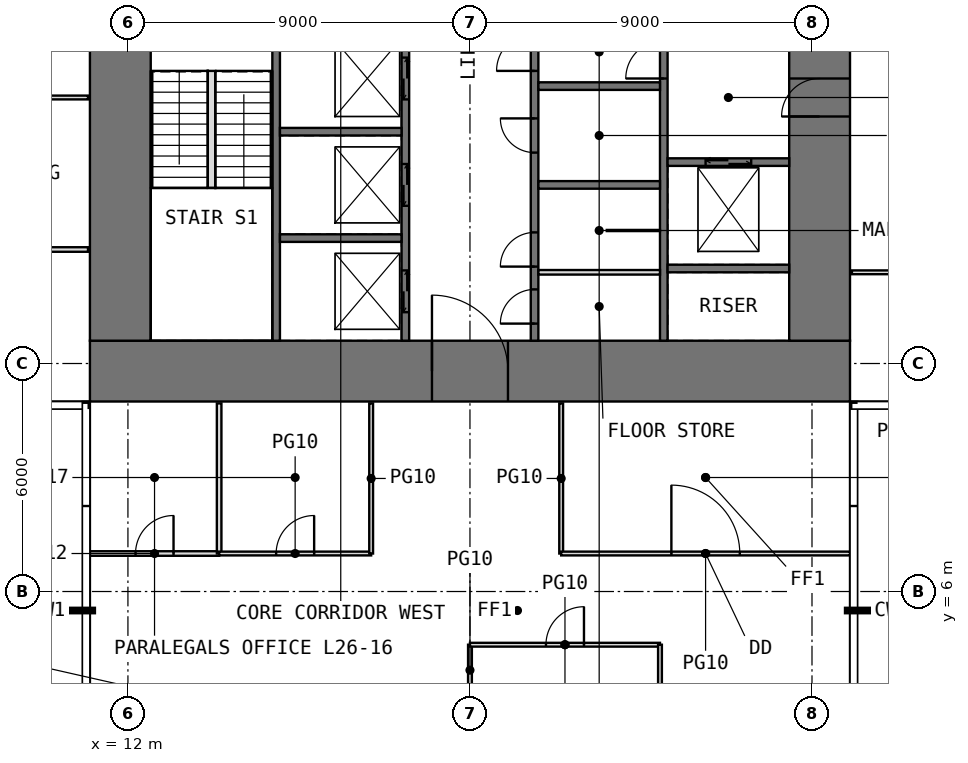
"""IFC4 building model, lengths in metres.
Left out: names, types, materials, properties, quantities, classifications, styles, units other than length and angle.
Written with IfcOpenShell. Run it as: python <this file> out.ifc"""

import sys

from ifc_helpers import new_model, si_unit, direction, frame, frame_2d, origin, place, context, subcontext, project, spatial, rectangle, extrude, element, fill, save


model = new_model("IFC4")
c1 = context("Model", 3, precision=1e-05, world=origin(), true_north=direction((0.0, 1.0)))
c2 = subcontext(c1, "Body", "Model", "MODEL_VIEW")
j1 = project(units=[si_unit("LENGTHUNIT", "METRE"), si_unit("PLANEANGLEUNIT", "RADIAN")], contexts=[c1])
p1 = place(None, origin())
s1 = spatial("IfcSite", under=j1, at=p1, CompositionType="ELEMENT")
p2 = place(p1, origin())
s2 = spatial("IfcBuilding", under=s1, at=p2, CompositionType="ELEMENT")
p3 = place(p2, frame((0.0, 0.0, 112.5)))
s3 = spatial("IfcBuildingStorey", under=s2, at=p3, CompositionType="ELEMENT", Elevation=112.5)
p4 = place(p3, frame((11.0, 11.8, -0.05), z_axis=(0.0, 0.0, 1.0), x_axis=(1.0, 0.0, 0.0)))
e1 = element("IfcWall", 1, at=p4, inside=s3, PredefinedType="SHEAR", context=c2, shape_type="SweptSolid", body=[
    extrude(rectangle(XDim=20.0, YDim=1.6, at=frame_2d((10.0, 0.0))), origin(), (0.0, 0.0, 1.0), 4.0),
])
p5 = place(p4, frame((9.0, 0.0, 0.05)))
e2 = element("IfcOpeningElement", 2, at=p5, cuts=e1, PredefinedType="OPENING", context=c2, shape_type="SweptSolid", body=[
    extrude(rectangle(XDim=2.0, YDim=2.2, at=frame_2d((1.0, 1.1))), frame((0.0, 0.81, 0.0), z_axis=(0.0, -1.0, 0.0), x_axis=(1.0, 0.0, 0.0)), (0.0, 0.0, 1.0), 1.62),
])
p6 = place(p3, frame((11.8, 12.6, -0.05), z_axis=(0.0, 0.0, 1.0), x_axis=(0.0, 1.0, 0.0)))
e3 = element("IfcWall", 3, at=p6, inside=s3, PredefinedType="SHEAR", context=c2, shape_type="SweptSolid", body=[
    extrude(rectangle(XDim=16.8, YDim=1.6, at=frame_2d((8.4, 0.0))), origin(), (0.0, 0.0, 1.0), 4.0),
])
p7 = place(p6, frame((9.9, 0.0, 0.05)))
e4 = element("IfcOpeningElement", 4, at=p7, cuts=e3, PredefinedType="OPENING", context=c2, shape_type="SweptSolid", body=[
    extrude(rectangle(XDim=1.0, YDim=2.2, at=frame_2d((0.5, 1.1))), frame((0.0, 0.81, 0.0), z_axis=(0.0, -1.0, 0.0), x_axis=(1.0, 0.0, 0.0)), (0.0, 0.0, 1.0), 1.62),
])
p8 = place(p3, frame((30.2, 12.6, -0.05), z_axis=(0.0, 0.0, 1.0), x_axis=(0.0, 1.0, 0.0)))
e5 = element("IfcWall", 5, at=p8, inside=s3, PredefinedType="SHEAR", context=c2, shape_type="SweptSolid", body=[
    extrude(rectangle(XDim=16.8, YDim=1.6, at=frame_2d((8.4, 0.0))), origin(), (0.0, 0.0, 1.0), 4.0),
])
p9 = place(p8, frame((5.9, 0.0, 0.05)))
e6 = element("IfcOpeningElement", 6, at=p9, cuts=e5, PredefinedType="OPENING", context=c2, shape_type="SweptSolid", body=[
    extrude(rectangle(XDim=1.0, YDim=2.2, at=frame_2d((0.5, 1.1))), frame((0.0, 0.81, 0.0), z_axis=(0.0, -1.0, 0.0), x_axis=(1.0, 0.0, 0.0)), (0.0, 0.0, 1.0), 1.62),
])
p10 = place(p3, frame((15.9, 12.6, -0.05), z_axis=(0.0, 0.0, 1.0), x_axis=(0.0, 1.0, 0.0)))
e7 = element("IfcWall", 7, at=p10, inside=s3, PredefinedType="SHEAR", context=c2, shape_type="SweptSolid", body=[
    extrude(rectangle(XDim=16.8, YDim=0.2, at=frame_2d((8.4, 0.0))), origin(), (0.0, 0.0, 1.0), 4.0),
])
p11 = place(p10, frame((8.9, 0.0, 0.05)))
e8 = element("IfcOpeningElement", 8, at=p11, cuts=e7, PredefinedType="OPENING", context=c2, shape_type="SweptSolid", body=[
    extrude(rectangle(XDim=1.0, YDim=2.2, at=frame_2d((0.5, 1.1))), frame((0.0, 0.11, 0.0), z_axis=(0.0, -1.0, 0.0), x_axis=(1.0, 0.0, 0.0)), (0.0, 0.0, 1.0), 0.22),
])
p12 = place(p3, frame((19.3, 12.6, -0.05), z_axis=(0.0, 0.0, 1.0), x_axis=(0.0, 1.0, 0.0)))
e9 = element("IfcWall", 9, at=p12, inside=s3, PredefinedType="SHEAR", context=c2, shape_type="SweptSolid", body=[
    extrude(rectangle(XDim=16.8, YDim=0.2, at=frame_2d((8.4, 0.0))), origin(), (0.0, 0.0, 1.0), 4.0),
])
p13 = place(p12, frame((8.7, 0.0, 0.05)))
e10 = element("IfcOpeningElement", 10, at=p13, cuts=e9, PredefinedType="OPENING", context=c2, shape_type="SweptSolid", body=[
    extrude(rectangle(XDim=1.0, YDim=2.2, at=frame_2d((0.5, 1.1))), frame((0.0, 0.11, 0.0), z_axis=(0.0, -1.0, 0.0), x_axis=(1.0, 0.0, 0.0)), (0.0, 0.0, 1.0), 0.22),
])
p14 = place(p12, frame((10.85, 0.0, 0.05)))
e11 = element("IfcOpeningElement", 11, at=p14, cuts=e9, PredefinedType="OPENING", context=c2, shape_type="SweptSolid", body=[
    extrude(rectangle(XDim=0.9, YDim=2.2, at=frame_2d((0.45, 1.1))), frame((0.0, 0.11, 0.0), z_axis=(0.0, -1.0, 0.0), x_axis=(1.0, 0.0, 0.0)), (0.0, 0.0, 1.0), 0.22),
])
p15 = place(p12, frame((13.3, 0.0, 0.05)))
e12 = element("IfcOpeningElement", 12, at=p15, cuts=e9, PredefinedType="OPENING", context=c2, shape_type="SweptSolid", body=[
    extrude(rectangle(XDim=1.0, YDim=2.2, at=frame_2d((0.5, 1.1))), frame((0.0, 0.11, 0.0), z_axis=(0.0, -1.0, 0.0), x_axis=(1.0, 0.0, 0.0)), (0.0, 0.0, 1.0), 0.22),
])
p16 = place(p12, frame((15.55, 0.0, 0.05)))
e13 = element("IfcOpeningElement", 13, at=p16, cuts=e9, PredefinedType="OPENING", context=c2, shape_type="SweptSolid", body=[
    extrude(rectangle(XDim=0.9, YDim=2.2, at=frame_2d((0.45, 1.1))), frame((0.0, 0.11, 0.0), z_axis=(0.0, -1.0, 0.0), x_axis=(1.0, 0.0, 0.0)), (0.0, 0.0, 1.0), 0.22),
])
p17 = place(p12, frame((0.75, 0.0, 0.05)))
e14 = element("IfcOpeningElement", 14, at=p17, cuts=e9, PredefinedType="OPENING", context=c2, shape_type="SweptSolid", body=[
    extrude(rectangle(XDim=1.1, YDim=2.2, at=frame_2d((0.55, 1.1))), frame((0.0, 0.11, 0.0), z_axis=(0.0, -1.0, 0.0), x_axis=(1.0, 0.0, 0.0)), (0.0, 0.0, 1.0), 0.22),
])
p18 = place(p12, frame((3.55, 0.0, 0.05)))
e15 = element("IfcOpeningElement", 15, at=p18, cuts=e9, PredefinedType="OPENING", context=c2, shape_type="SweptSolid", body=[
    extrude(rectangle(XDim=1.1, YDim=2.2, at=frame_2d((0.55, 1.1))), frame((0.0, 0.11, 0.0), z_axis=(0.0, -1.0, 0.0), x_axis=(1.0, 0.0, 0.0)), (0.0, 0.0, 1.0), 0.22),
])
p19 = place(p12, frame((6.35, 0.0, 0.05)))
e16 = element("IfcOpeningElement", 16, at=p19, cuts=e9, PredefinedType="OPENING", context=c2, shape_type="SweptSolid", body=[
    extrude(rectangle(XDim=1.1, YDim=2.2, at=frame_2d((0.55, 1.1))), frame((0.0, 0.11, 0.0), z_axis=(0.0, -1.0, 0.0), x_axis=(1.0, 0.0, 0.0)), (0.0, 0.0, 1.0), 0.22),
])
p20 = place(p3, frame((22.7, 12.6, -0.05), z_axis=(0.0, 0.0, 1.0), x_axis=(0.0, 1.0, 0.0)))
e17 = element("IfcWall", 17, at=p20, inside=s3, PredefinedType="SHEAR", context=c2, shape_type="SweptSolid", body=[
    extrude(rectangle(XDim=16.8, YDim=0.2, at=frame_2d((8.4, 0.0))), origin(), (0.0, 0.0, 1.0), 4.0),
])
p21 = place(p20, frame((0.45, 0.0, 0.05)))
e18 = element("IfcOpeningElement", 18, at=p21, cuts=e17, PredefinedType="OPENING", context=c2, shape_type="SweptSolid", body=[
    extrude(rectangle(XDim=0.9, YDim=2.2, at=frame_2d((0.45, 1.1))), frame((0.0, 0.11, 0.0), z_axis=(0.0, -1.0, 0.0), x_axis=(1.0, 0.0, 0.0)), (0.0, 0.0, 1.0), 0.22),
])
p22 = place(p20, frame((7.1, 0.0, 0.05)))
e19 = element("IfcOpeningElement", 19, at=p22, cuts=e17, PredefinedType="OPENING", context=c2, shape_type="SweptSolid", body=[
    extrude(rectangle(XDim=1.0, YDim=2.2, at=frame_2d((0.5, 1.1))), frame((0.0, 0.11, 0.0), z_axis=(0.0, -1.0, 0.0), x_axis=(1.0, 0.0, 0.0)), (0.0, 0.0, 1.0), 0.22),
])
p23 = place(p20, frame((1.95, 0.0, 0.05)))
e20 = element("IfcOpeningElement", 20, at=p23, cuts=e17, PredefinedType="OPENING", context=c2, shape_type="SweptSolid", body=[
    extrude(rectangle(XDim=0.9, YDim=2.2, at=frame_2d((0.45, 1.1))), frame((0.0, 0.11, 0.0), z_axis=(0.0, -1.0, 0.0), x_axis=(1.0, 0.0, 0.0)), (0.0, 0.0, 1.0), 0.22),
])
p24 = place(p20, frame((4.95, 0.0, 0.05)))
e21 = element("IfcOpeningElement", 21, at=p24, cuts=e17, PredefinedType="OPENING", context=c2, shape_type="SweptSolid", body=[
    extrude(rectangle(XDim=0.9, YDim=2.2, at=frame_2d((0.45, 1.1))), frame((0.0, 0.11, 0.0), z_axis=(0.0, -1.0, 0.0), x_axis=(1.0, 0.0, 0.0)), (0.0, 0.0, 1.0), 0.22),
])
p25 = place(p20, frame((9.4, 0.0, 0.05)))
e22 = element("IfcOpeningElement", 22, at=p25, cuts=e17, PredefinedType="OPENING", context=c2, shape_type="SweptSolid", body=[
    extrude(rectangle(XDim=1.0, YDim=2.2, at=frame_2d((0.5, 1.1))), frame((0.0, 0.11, 0.0), z_axis=(0.0, -1.0, 0.0), x_axis=(1.0, 0.0, 0.0)), (0.0, 0.0, 1.0), 0.22),
])
p26 = place(p3, frame((26.1, 12.6, -0.05), z_axis=(0.0, 0.0, 1.0), x_axis=(0.0, 1.0, 0.0)))
e23 = element("IfcWall", 23, at=p26, inside=s3, PredefinedType="SHEAR", context=c2, shape_type="SweptSolid", body=[
    extrude(rectangle(XDim=16.8, YDim=0.2, at=frame_2d((8.4, 0.0))), origin(), (0.0, 0.0, 1.0), 4.0),
])
p27 = place(p26, frame((6.9, 0.0, 0.05)))
e24 = element("IfcOpeningElement", 24, at=p27, cuts=e23, PredefinedType="OPENING", context=c2, shape_type="SweptSolid", body=[
    extrude(rectangle(XDim=1.0, YDim=2.2, at=frame_2d((0.5, 1.1))), frame((0.0, 0.11, 0.0), z_axis=(0.0, -1.0, 0.0), x_axis=(1.0, 0.0, 0.0)), (0.0, 0.0, 1.0), 0.22),
])
for number, where, z_axis, x_axis in (
    (25, (16.0, 15.3, -0.05), (0.0, 0.0, 1.0), (1.0, 0.0, 0.0)),
    (26, (16.0, 18.1, -0.05), (0.0, 0.0, 1.0), (1.0, 0.0, 0.0)),
    (27, (22.8, 16.7, -0.05), (0.0, 0.0, 1.0), (1.0, 0.0, 0.0)),
    (28, (22.8, 19.3, -0.05), (0.0, 0.0, 1.0), (1.0, 0.0, 0.0)),
    (29, (26.2, 14.5, -0.05), (0.0, 0.0, 1.0), (1.0, 0.0, 0.0)),
):
    element("IfcWall", number, at=place(p3, frame(where, z_axis=z_axis, x_axis=x_axis)), inside=s3, PredefinedType="SHEAR", context=c2, shape_type="SweptSolid", body=[
        extrude(rectangle(XDim=3.2, YDim=0.2, at=frame_2d((1.6, 0.0))), origin(), (0.0, 0.0, 1.0), 4.0),
    ])
p28 = place(p3, frame((26.2, 17.3, -0.05), z_axis=(0.0, 0.0, 1.0), x_axis=(1.0, 0.0, 0.0)))
e30 = element("IfcWall", 30, at=p28, inside=s3, PredefinedType="SHEAR", context=c2, shape_type="SweptSolid", body=[
    extrude(rectangle(XDim=3.2, YDim=0.2, at=frame_2d((1.6, 0.0))), origin(), (0.0, 0.0, 1.0), 4.0),
])
p29 = place(p28, frame((1.0, 0.0, 0.05)))
e31 = element("IfcOpeningElement", 31, at=p29, cuts=e30, PredefinedType="OPENING", context=c2, shape_type="SweptSolid", body=[
    extrude(rectangle(XDim=1.2, YDim=2.2, at=frame_2d((0.6, 1.1))), frame((0.0, 0.11, 0.0), z_axis=(0.0, -1.0, 0.0), x_axis=(1.0, 0.0, 0.0)), (0.0, 0.0, 1.0), 0.22),
])
p30 = place(p3, frame((22.8, 14.4, 0.0), z_axis=(0.0, 0.0, 1.0), x_axis=(1.0, 0.0, 0.0)))
e32 = element("IfcWall", 32, at=p30, inside=s3, PredefinedType="PARTITIONING", context=c2, shape_type="SweptSolid", body=[
    extrude(rectangle(XDim=3.2, YDim=0.12, at=frame_2d((1.6, 0.0))), origin(), (0.0, 0.0, 1.0), 3.75),
])
p31 = place(p3, frame((24.6, 15.5, 0.0), z_axis=(0.0, 0.0, 1.0), x_axis=(1.0, 0.0, 0.0)))
e33 = element("IfcWall", 33, at=p31, inside=s3, PredefinedType="PARTITIONING", context=c2, shape_type="SweptSolid", body=[
    extrude(rectangle(XDim=1.4, YDim=0.03, at=frame_2d((0.7, 0.0))), origin(), (0.0, 0.0, 1.0), 3.75),
])
p32 = place(p3, frame((7.0, 15.0, 0.0), z_axis=(0.0, 0.0, 1.0), x_axis=(1.0, 0.0, 0.0)))
e34 = element("IfcWall", 34, at=p32, inside=s3, PredefinedType="PARTITIONING", context=c2, shape_type="SweptSolid", body=[
    extrude(rectangle(XDim=3.95, YDim=0.12, at=frame_2d((1.975, 0.0))), origin(), (0.0, 0.0, 1.0), 3.75),
])
p33 = place(p3, frame((7.0, 19.0, 0.0), z_axis=(0.0, 0.0, 1.0), x_axis=(1.0, 0.0, 0.0)))
e35 = element("IfcWall", 35, at=p33, inside=s3, PredefinedType="PARTITIONING", context=c2, shape_type="SweptSolid", body=[
    extrude(rectangle(XDim=3.95, YDim=0.1, at=frame_2d((1.975, 0.0))), origin(), (0.0, 0.0, 1.0), 3.75),
])
p34 = place(p3, frame((11.0, 7.0, 0.0), z_axis=(0.0, 0.0, 1.0), x_axis=(1.0, 0.0, 0.0)))
e36 = element("IfcWall", 36, at=p34, inside=s3, PredefinedType="PARTITIONING", context=c2, shape_type="SweptSolid", body=[
    extrude(rectangle(XDim=3.4, YDim=0.12, at=frame_2d((1.7, 0.0))), origin(), (0.0, 0.0, 1.0), 3.75),
])
p35 = place(p34, frame((1.2, 0.0, 0.0)))
e37 = element("IfcOpeningElement", 37, at=p35, cuts=e36, PredefinedType="OPENING", context=c2, shape_type="SweptSolid", body=[
    extrude(rectangle(XDim=1.0, YDim=2.2, at=frame_2d((0.5, 1.1))), frame((0.0, 0.07, 0.0), z_axis=(0.0, -1.0, 0.0), x_axis=(1.0, 0.0, 0.0)), (0.0, 0.0, 1.0), 0.14),
])
p36 = place(p3, frame((14.4, 7.0, 0.0), z_axis=(0.0, 0.0, 1.0), x_axis=(0.0, 1.0, 0.0)))
e38 = element("IfcWall", 38, at=p36, inside=s3, PredefinedType="PARTITIONING", context=c2, shape_type="SweptSolid", body=[
    extrude(rectangle(XDim=3.95, YDim=0.12, at=frame_2d((1.975, 0.0))), origin(), (0.0, 0.0, 1.0), 3.75),
])
p37 = place(p3, frame((14.4, 7.0, 0.0), z_axis=(0.0, 0.0, 1.0), x_axis=(1.0, 0.0, 0.0)))
e39 = element("IfcWall", 39, at=p37, inside=s3, PredefinedType="PARTITIONING", context=c2, shape_type="SweptSolid", body=[
    extrude(rectangle(XDim=4.0, YDim=0.1, at=frame_2d((2.0, 0.0))), origin(), (0.0, 0.0, 1.0), 3.75),
])
p38 = place(p37, frame((1.5, 0.0, 0.0)))
e40 = element("IfcOpeningElement", 40, at=p38, cuts=e39, PredefinedType="OPENING", context=c2, shape_type="SweptSolid", body=[
    extrude(rectangle(XDim=1.0, YDim=2.4, at=frame_2d((0.5, 1.2))), frame((0.0, 0.06, 0.0), z_axis=(0.0, -1.0, 0.0), x_axis=(1.0, 0.0, 0.0)), (0.0, 0.0, 1.0), 0.12),
])
p39 = place(p3, frame((18.4, 7.0, 0.0), z_axis=(0.0, 0.0, 1.0), x_axis=(0.0, 1.0, 0.0)))
e41 = element("IfcWall", 41, at=p39, inside=s3, PredefinedType="PARTITIONING", context=c2, shape_type="SweptSolid", body=[
    extrude(rectangle(XDim=3.95, YDim=0.1, at=frame_2d((1.975, 0.0))), origin(), (0.0, 0.0, 1.0), 3.75),
])
p40 = place(p3, frame((21.0, 3.26, 0.0), z_axis=(0.0, 0.0, 1.0), x_axis=(0.0, 1.0, 0.0)))
e42 = element("IfcWall", 42, at=p40, inside=s3, PredefinedType="PARTITIONING", context=c2, shape_type="SweptSolid", body=[
    extrude(rectangle(XDim=1.34, YDim=0.1, at=frame_2d((0.67, 0.0))), origin(), (0.0, 0.0, 1.0), 3.75),
])
p41 = place(p3, frame((21.0, 4.6, 0.0), z_axis=(0.0, 0.0, 1.0), x_axis=(1.0, 0.0, 0.0)))
e43 = element("IfcWall", 43, at=p41, inside=s3, PredefinedType="PARTITIONING", context=c2, shape_type="SweptSolid", body=[
    extrude(rectangle(XDim=5.0, YDim=0.1, at=frame_2d((2.5, 0.0))), origin(), (0.0, 0.0, 1.0), 3.75),
])
p42 = place(p41, frame((2.0, 0.0, 0.0)))
e44 = element("IfcOpeningElement", 44, at=p42, cuts=e43, PredefinedType="OPENING", context=c2, shape_type="SweptSolid", body=[
    extrude(rectangle(XDim=1.0, YDim=2.4, at=frame_2d((0.5, 1.2))), frame((0.0, 0.06, 0.0), z_axis=(0.0, -1.0, 0.0), x_axis=(1.0, 0.0, 0.0)), (0.0, 0.0, 1.0), 0.12),
])
p43 = place(p3, frame((23.4, 7.0, 0.0), z_axis=(0.0, 0.0, 1.0), x_axis=(0.0, 1.0, 0.0)))
e45 = element("IfcWall", 45, at=p43, inside=s3, PredefinedType="PARTITIONING", context=c2, shape_type="SweptSolid", body=[
    extrude(rectangle(XDim=3.95, YDim=0.1, at=frame_2d((1.975, 0.0))), origin(), (0.0, 0.0, 1.0), 3.75),
])
p44 = place(p3, frame((23.4, 7.0, 0.0), z_axis=(0.0, 0.0, 1.0), x_axis=(1.0, 0.0, 0.0)))
e46 = element("IfcWall", 46, at=p44, inside=s3, PredefinedType="PARTITIONING", context=c2, shape_type="SweptSolid", body=[
    extrude(rectangle(XDim=7.6, YDim=0.1, at=frame_2d((3.8, 0.0))), origin(), (0.0, 0.0, 1.0), 3.75),
])
p45 = place(p44, frame((2.9, 0.0, 0.0)))
e47 = element("IfcOpeningElement", 47, at=p45, cuts=e46, PredefinedType="OPENING", context=c2, shape_type="SweptSolid", body=[
    extrude(rectangle(XDim=1.8, YDim=2.4, at=frame_2d((0.9, 1.2))), frame((0.0, 0.06, 0.0), z_axis=(0.0, -1.0, 0.0), x_axis=(1.0, 0.0, 0.0)), (0.0, 0.0, 1.0), 0.12),
])
p46 = place(p3, frame((26.0, 1.31, 0.0), z_axis=(0.0, 0.0, 1.0), x_axis=(0.0, 1.0, 0.0)))
e48 = element("IfcWall", 48, at=p46, inside=s3, PredefinedType="PARTITIONING", context=c2, shape_type="SweptSolid", body=[
    extrude(rectangle(XDim=3.29, YDim=0.1, at=frame_2d((1.645, 0.0))), origin(), (0.0, 0.0, 1.0), 3.75),
])
p47 = place(p3, frame((31.05, 14.4, 0.0), z_axis=(0.0, 0.0, 1.0), x_axis=(1.0, 0.0, 0.0)))
e49 = element("IfcWall", 49, at=p47, inside=s3, PredefinedType="PARTITIONING", context=c2, shape_type="SweptSolid", body=[
    extrude(rectangle(XDim=3.95, YDim=0.1, at=frame_2d((1.975, 0.0))), origin(), (0.0, 0.0, 1.0), 3.75),
])
p48 = place(p3, frame((14.2, 16.62, 0.0), z_axis=(0.0, 0.0, 1.0), x_axis=(0.0, 1.0, 0.0)))
e50 = element("IfcWall", 50, at=p48, inside=s3, PredefinedType="PARTITIONING", context=c2, shape_type="SweptSolid", body=[
    extrude(rectangle(XDim=3.08, YDim=0.2, at=frame_2d((1.54, 0.0))), origin(), (0.0, 0.0, 1.0), 4.0),
])
p49 = place(p5, origin())
e51 = element("IfcDoor", 51, at=p49, inside=s3, OperationType="DOUBLE_DOOR_SINGLE_SWING", PredefinedType="DOOR", context=c2, shape_type="SweptSolid", body=[
    extrude(rectangle(XDim=2.0, YDim=2.2, at=frame_2d((1.0, 1.1))), frame((0.0, 0.025, 0.0), z_axis=(0.0, -1.0, 0.0), x_axis=(1.0, 0.0, 0.0)), (0.0, 0.0, 1.0), 0.05),
])
fill(e2, e51)
p50 = place(p21, origin())
e52 = element("IfcDoor", 52, at=p50, inside=s3, OperationType="SINGLE_SWING_LEFT", PredefinedType="DOOR", context=c2, shape_type="SweptSolid", body=[
    extrude(rectangle(XDim=0.9, YDim=2.2, at=frame_2d((0.45, 1.1))), frame((0.0, 0.025, 0.0), z_axis=(0.0, -1.0, 0.0), x_axis=(1.0, 0.0, 0.0)), (0.0, 0.0, 1.0), 0.05),
])
fill(e18, e52)
p51 = place(p9, origin())
e53 = element("IfcDoor", 53, at=p51, inside=s3, OperationType="SINGLE_SWING_LEFT", PredefinedType="DOOR", context=c2, shape_type="SweptSolid", body=[
    extrude(rectangle(XDim=1.0, YDim=2.2, at=frame_2d((0.5, 1.1))), frame((0.0, 0.025, 0.0), z_axis=(0.0, -1.0, 0.0), x_axis=(1.0, 0.0, 0.0)), (0.0, 0.0, 1.0), 0.05),
])
fill(e6, e53)
p52 = place(p27, origin())
e54 = element("IfcDoor", 54, at=p52, inside=s3, OperationType="SINGLE_SWING_LEFT", PredefinedType="DOOR", context=c2, shape_type="SweptSolid", body=[
    extrude(rectangle(XDim=1.0, YDim=2.2, at=frame_2d((0.5, 1.1))), frame((0.0, 0.025, 0.0), z_axis=(0.0, -1.0, 0.0), x_axis=(1.0, 0.0, 0.0)), (0.0, 0.0, 1.0), 0.05),
])
fill(e24, e54)
p53 = place(p22, origin())
e55 = element("IfcDoor", 55, at=p53, inside=s3, OperationType="SINGLE_SWING_LEFT", PredefinedType="DOOR", context=c2, shape_type="SweptSolid", body=[
    extrude(rectangle(XDim=1.0, YDim=2.2, at=frame_2d((0.5, 1.1))), frame((0.0, 0.025, 0.0), z_axis=(0.0, -1.0, 0.0), x_axis=(1.0, 0.0, 0.0)), (0.0, 0.0, 1.0), 0.05),
])
fill(e19, e55)
p54 = place(p23, origin())
e56 = element("IfcDoor", 56, at=p54, inside=s3, OperationType="SINGLE_SWING_LEFT", PredefinedType="DOOR", context=c2, shape_type="SweptSolid", body=[
    extrude(rectangle(XDim=0.9, YDim=2.2, at=frame_2d((0.45, 1.1))), frame((0.0, 0.025, 0.0), z_axis=(0.0, -1.0, 0.0), x_axis=(1.0, 0.0, 0.0)), (0.0, 0.0, 1.0), 0.05),
])
fill(e20, e56)
p55 = place(p24, origin())
e57 = element("IfcDoor", 57, at=p55, inside=s3, OperationType="SINGLE_SWING_RIGHT", PredefinedType="DOOR", context=c2, shape_type="SweptSolid", body=[
    extrude(rectangle(XDim=0.9, YDim=2.2, at=frame_2d((0.45, 1.1))), frame((0.0, 0.025, 0.0), z_axis=(0.0, -1.0, 0.0), x_axis=(1.0, 0.0, 0.0)), (0.0, 0.0, 1.0), 0.05),
])
fill(e21, e57)
p56 = place(p35, origin())
e58 = element("IfcDoor", 58, at=p56, inside=s3, OperationType="SINGLE_SWING_RIGHT", PredefinedType="DOOR", context=c2, shape_type="SweptSolid", body=[
    extrude(rectangle(XDim=1.0, YDim=2.2, at=frame_2d((0.5, 1.1))), frame((0.0, 0.025, 0.0), z_axis=(0.0, -1.0, 0.0), x_axis=(1.0, 0.0, 0.0)), (0.0, 0.0, 1.0), 0.05),
])
fill(e37, e58)
p57 = place(p38, origin())
e59 = element("IfcDoor", 59, at=p57, inside=s3, OperationType="SINGLE_SWING_RIGHT", PredefinedType="DOOR", context=c2, shape_type="SweptSolid", body=[
    extrude(rectangle(XDim=1.0, YDim=2.4, at=frame_2d((0.5, 1.2))), frame((0.0, 0.025, 0.0), z_axis=(0.0, -1.0, 0.0), x_axis=(1.0, 0.0, 0.0)), (0.0, 0.0, 1.0), 0.05),
])
fill(e40, e59)
p58 = place(p45, origin())
e60 = element("IfcDoor", 60, at=p58, inside=s3, OperationType="DOUBLE_DOOR_SINGLE_SWING", PredefinedType="DOOR", context=c2, shape_type="SweptSolid", body=[
    extrude(rectangle(XDim=1.8, YDim=2.4, at=frame_2d((0.9, 1.2))), frame((0.0, 0.025, 0.0), z_axis=(0.0, -1.0, 0.0), x_axis=(1.0, 0.0, 0.0)), (0.0, 0.0, 1.0), 0.05),
])
fill(e47, e60)
p59 = place(p42, origin())
e61 = element("IfcDoor", 61, at=p59, inside=s3, OperationType="SINGLE_SWING_RIGHT", PredefinedType="DOOR", context=c2, shape_type="SweptSolid", body=[
    extrude(rectangle(XDim=1.0, YDim=2.4, at=frame_2d((0.5, 1.2))), frame((0.0, 0.025, 0.0), z_axis=(0.0, -1.0, 0.0), x_axis=(1.0, 0.0, 0.0)), (0.0, 0.0, 1.0), 0.05),
])
fill(e44, e61)
p60 = place(p17, origin())
e62 = element("IfcDoor", 62, at=p60, inside=s3, OperationType="DOUBLE_DOOR_SLIDING", PredefinedType="DOOR", context=c2, shape_type="SweptSolid", body=[
    extrude(rectangle(XDim=1.1, YDim=2.2, at=frame_2d((0.55, 1.1))), frame((0.0, 0.025, 0.0), z_axis=(0.0, -1.0, 0.0), x_axis=(1.0, 0.0, 0.0)), (0.0, 0.0, 1.0), 0.05),
])
fill(e14, e62)
p61 = place(p18, origin())
e63 = element("IfcDoor", 63, at=p61, inside=s3, OperationType="DOUBLE_DOOR_SLIDING", PredefinedType="DOOR", context=c2, shape_type="SweptSolid", body=[
    extrude(rectangle(XDim=1.1, YDim=2.2, at=frame_2d((0.55, 1.1))), frame((0.0, 0.025, 0.0), z_axis=(0.0, -1.0, 0.0), x_axis=(1.0, 0.0, 0.0)), (0.0, 0.0, 1.0), 0.05),
])
fill(e15, e63)
p62 = place(p19, origin())
e64 = element("IfcDoor", 64, at=p62, inside=s3, OperationType="DOUBLE_DOOR_SLIDING", PredefinedType="DOOR", context=c2, shape_type="SweptSolid", body=[
    extrude(rectangle(XDim=1.1, YDim=2.2, at=frame_2d((0.55, 1.1))), frame((0.0, 0.025, 0.0), z_axis=(0.0, -1.0, 0.0), x_axis=(1.0, 0.0, 0.0)), (0.0, 0.0, 1.0), 0.05),
])
fill(e16, e64)
p63 = place(p29, origin())
e65 = element("IfcDoor", 65, at=p63, inside=s3, OperationType="DOUBLE_DOOR_SLIDING", PredefinedType="DOOR", context=c2, shape_type="SweptSolid", body=[
    extrude(rectangle(XDim=1.2, YDim=2.2, at=frame_2d((0.6, 1.1))), frame((0.0, 0.025, 0.0), z_axis=(0.0, -1.0, 0.0), x_axis=(1.0, 0.0, 0.0)), (0.0, 0.0, 1.0), 0.05),
])
fill(e31, e65)
save(model, sys.argv[1])
